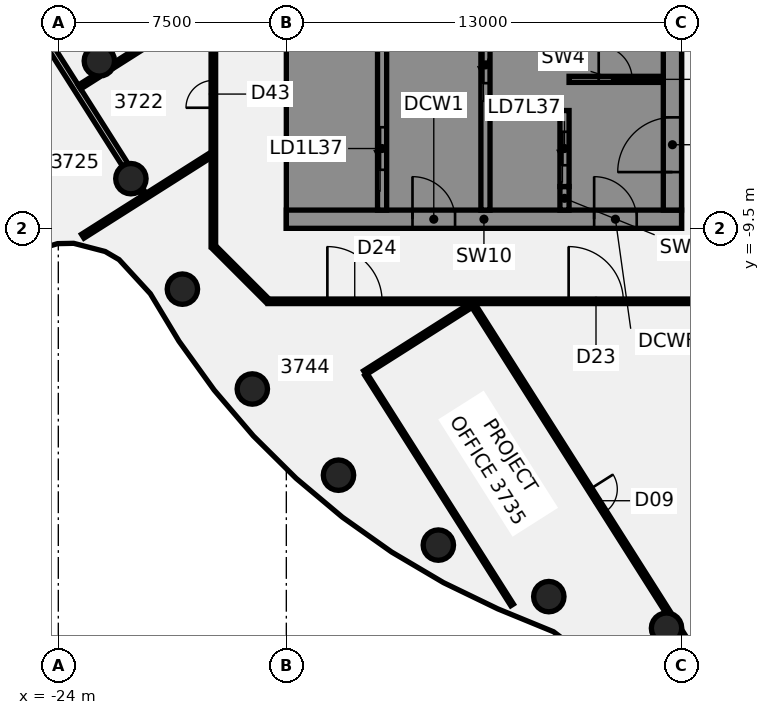
"""IFC4 building model, lengths in metres.
Left out: names, types, materials, properties, quantities, classifications, styles, units other than length and angle.
Written with IfcOpenShell. Run it as: python <this file> out.ifc"""

import sys

from ifc_helpers import new_model, si_unit, direction, frame, frame_2d, origin, origin_2d, place, context, subcontext, project, spatial, polyline, rectangle, circle, outline, extrude, element, fill, save


model = new_model("IFC4")
c1 = context("Model", 3, precision=1e-05, world=origin(), true_north=direction((0.0, 1.0)))
c2 = subcontext(c1, "Body", "Model", "MODEL_VIEW")
j1 = project(units=[si_unit("LENGTHUNIT", "METRE"), si_unit("PLANEANGLEUNIT", "RADIAN")], contexts=[c1])
p1 = place(None, origin())
s1 = spatial("IfcSite", under=j1, at=p1, CompositionType="ELEMENT")
p2 = place(p1, origin())
s2 = spatial("IfcBuilding", under=s1, at=p2, CompositionType="ELEMENT")
p3 = place(p2, frame((0.0, 0.0, 151.75)))
s3 = spatial("IfcBuildingStorey", under=s2, at=p3, CompositionType="ELEMENT", Elevation=151.75)
for number, where, z_axis, x_axis in (
    (1, (-22.651, -3.994, -0.14), (0.0, 0.0, 1.0), (1.0, 0.0, 0.0)),
    (2, (-21.613, -7.866, -0.14), (0.0, 0.0, 1.0), (1.0, 0.0, 0.0)),
    (3, (-19.919, -11.5, -0.14), (0.0, 0.0, 1.0), (1.0, 0.0, 0.0)),
    (4, (-17.619, -14.784, -0.14), (0.0, 0.0, 1.0), (1.0, 0.0, 0.0)),
    (5, (-14.784, -17.619, -0.14), (0.0, 0.0, 1.0), (1.0, 0.0, 0.0)),
    (6, (-11.5, -19.919, -0.14), (0.0, 0.0, 1.0), (1.0, 0.0, 0.0)),
    (7, (-7.866, -21.613, -0.14), (0.0, 0.0, 1.0), (1.0, 0.0, 0.0)),
    (8, (-3.994, -22.651, -0.14), (0.0, 0.0, 1.0), (1.0, 0.0, 0.0)),
):
    element("IfcColumn", number, at=place(p3, frame(where, z_axis=z_axis, x_axis=x_axis)), inside=s3, PredefinedType="COLUMN", context=c2, shape_type="SweptSolid", body=[
        extrude(circle(Radius=0.5, at=origin_2d()), origin(), (0.0, 0.0, 1.0), 3.75),
    ])
p4 = place(p3, frame((-28.798, 3.621, 0.0), z_axis=(0.0, 0.0, 1.0), x_axis=(0.535688347335, -0.844415771128, 0.0)))
e9 = element("IfcWall", 9, at=p4, inside=s3, PredefinedType="PARTITIONING", context=c2, shape_type="SweptSolid", body=[
    extrude(rectangle(XDim=13.06, YDim=0.2, at=frame_2d((6.53, 0.0))), origin(), (0.0, 0.0, 1.0), 3.01),
])
p5 = place(p4, frame((5.799, 0.0, 0.0)))
e10 = element("IfcOpeningElement", 10, at=p5, cuts=e9, PredefinedType="OPENING", context=c2, shape_type="SweptSolid", body=[
    extrude(rectangle(XDim=1.4, YDim=2.1, at=frame_2d((0.7, 1.05))), frame((0.0, 0.11, 0.0), z_axis=(0.0, -1.0, 0.0), x_axis=(1.0, 0.0, 0.0)), (0.0, 0.0, 1.0), 0.22),
])
p6 = place(p3, frame((-21.28, -8.23, 0.0), z_axis=(0.0, 0.0, 1.0), x_axis=(0.535205480582, -0.844721903087, 0.0)))
e11 = element("IfcWall", 11, at=p6, inside=s3, PredefinedType="PARTITIONING", context=c2, shape_type="SweptSolid", body=[
    extrude(rectangle(XDim=0.189, YDim=0.15, at=frame_2d((0.095, 0.0))), origin(), (0.0, 0.0, 1.0), 3.01),
])
p7 = place(p3, frame((-13.877, -14.312, 0.0), z_axis=(0.0, 0.0, 1.0), x_axis=(0.535664679525, -0.844430785268, 0.0)))
e12 = element("IfcWall", 12, at=p7, inside=s3, PredefinedType="PARTITIONING", context=c2, shape_type="SweptSolid", body=[
    extrude(rectangle(XDim=8.967, YDim=0.1, at=frame_2d((4.484, 0.0))), origin(), (0.0, 0.0, 1.0), 3.01),
])
p8 = place(p3, frame((-10.327, -12.067, 0.0), z_axis=(0.0, 0.0, 1.0), x_axis=(0.535642730436, -0.844444708273, 0.0)))
e13 = element("IfcWall", 13, at=p8, inside=s3, PredefinedType="PARTITIONING", context=c2, shape_type="SweptSolid", body=[
    extrude(rectangle(XDim=12.103, YDim=0.15, at=frame_2d((6.051, 0.0))), origin(), (0.0, 0.0, 1.0), 3.01),
])
p9 = place(p8, frame((7.12, 0.0, 0.0)))
e14 = element("IfcOpeningElement", 14, at=p9, cuts=e13, PredefinedType="OPENING", context=c2, shape_type="SweptSolid", body=[
    extrude(rectangle(XDim=0.9, YDim=2.1, at=frame_2d((0.45, 1.05))), frame((0.0, 0.085, 0.0), z_axis=(0.0, -1.0, 0.0), x_axis=(1.0, 0.0, 0.0)), (0.0, 0.0, 1.0), 0.17),
])
p10 = place(p3, frame((-3.604, -22.667, 0.0), z_axis=(0.0, 0.0, 1.0), x_axis=(0.535643435477, -0.844444261056, 0.0)))
e15 = element("IfcWall", 15, at=p10, inside=s3, PredefinedType="PARTITIONING", context=c2, shape_type="SweptSolid", body=[
    extrude(rectangle(XDim=5.067, YDim=0.15, at=frame_2d((2.533, 0.0))), origin(), (0.0, 0.0, 1.0), 3.01),
])
p11 = place(p10, frame((1.717, 0.0, 0.0)))
e16 = element("IfcOpeningElement", 16, at=p11, cuts=e15, PredefinedType="OPENING", context=c2, shape_type="SweptSolid", body=[
    extrude(rectangle(XDim=0.9, YDim=2.1, at=frame_2d((0.45, 1.05))), frame((0.0, 0.085, 0.0), z_axis=(0.0, -1.0, 0.0), x_axis=(1.0, 0.0, 0.0)), (0.0, 0.0, 1.0), 0.17),
])
p12 = place(p3, frame((-18.872, -10.128, 0.0), z_axis=(0.0, 0.0, 1.0), x_axis=(0.707106781187, -0.707106781187, 0.0)))
e17 = element("IfcWall", 17, at=p12, inside=s3, PredefinedType="PARTITIONING", context=c2, shape_type="SweptSolid", body=[
    extrude(rectangle(XDim=2.465, YDim=0.15, at=frame_2d((1.232, 0.0))), origin(), (0.0, 0.0, 1.0), 3.01),
])
p13 = place(p3, frame((-17.1, -11.9, 0.0), z_axis=(0.0, 0.0, 1.0), x_axis=(1.0, 0.0, 0.0)))
e18 = element("IfcWall", 18, at=p13, inside=s3, PredefinedType="PARTITIONING", context=c2, shape_type="SweptSolid", body=[
    extrude(rectangle(XDim=34.165, YDim=0.15, at=frame_2d((17.083, 0.0))), origin(), (0.0, 0.0, 1.0), 3.01),
])
p14 = place(p13, frame((9.886, 0.0, 0.0)))
e19 = element("IfcOpeningElement", 19, at=p14, cuts=e18, PredefinedType="OPENING", context=c2, shape_type="SweptSolid", body=[
    extrude(rectangle(XDim=1.8, YDim=2.1, at=frame_2d((0.9, 1.05))), frame((0.0, 0.085, 0.0), z_axis=(0.0, -1.0, 0.0), x_axis=(1.0, 0.0, 0.0)), (0.0, 0.0, 1.0), 0.17),
])
p15 = place(p13, frame((1.95, 0.0, 0.0)))
e20 = element("IfcOpeningElement", 20, at=p15, cuts=e18, PredefinedType="OPENING", context=c2, shape_type="SweptSolid", body=[
    extrude(rectangle(XDim=1.8, YDim=2.1, at=frame_2d((0.9, 1.05))), frame((0.0, 0.085, 0.0), z_axis=(0.0, -1.0, 0.0), x_axis=(1.0, 0.0, 0.0)), (0.0, 0.0, 1.0), 0.17),
])
p16 = place(p13, frame((24.043, 0.0, 0.0)))
e21 = element("IfcOpeningElement", 21, at=p16, cuts=e18, PredefinedType="OPENING", context=c2, shape_type="SweptSolid", body=[
    extrude(rectangle(XDim=1.8, YDim=2.1, at=frame_2d((0.9, 1.05))), frame((0.0, 0.085, 0.0), z_axis=(0.0, -1.0, 0.0), x_axis=(1.0, 0.0, 0.0)), (0.0, 0.0, 1.0), 0.17),
])
p17 = place(p3, frame((-23.304, -4.854, 0.0), z_axis=(0.0, 0.0, 1.0), x_axis=(0.844332505382, 0.535819578174, 0.0)))
e22 = element("IfcWall", 22, at=p17, inside=s3, PredefinedType="PARTITIONING", context=c2, shape_type="SweptSolid", body=[
    extrude(rectangle(XDim=0.688, YDim=0.15, at=frame_2d((0.344, 0.0))), origin(), (0.0, 0.0, 1.0), 3.01),
])
p18 = place(p3, frame((-22.18, -4.141, 0.0), z_axis=(0.0, 0.0, 1.0), x_axis=(0.844431403995, 0.535663704153, 0.0)))
e23 = element("IfcWall", 23, at=p18, inside=s3, PredefinedType="PARTITIONING", context=c2, shape_type="SweptSolid", body=[
    extrude(rectangle(XDim=3.769, YDim=0.15, at=frame_2d((1.885, 0.0))), origin(), (0.0, 0.0, 1.0), 3.01),
])
p19 = place(p3, frame((-23.197, -9.759, 0.0), z_axis=(0.0, 0.0, 1.0), x_axis=(0.844477168242, 0.535591553629, 0.0)))
e24 = element("IfcWall", 24, at=p19, inside=s3, PredefinedType="PARTITIONING", context=c2, shape_type="SweptSolid", body=[
    extrude(rectangle(XDim=4.973, YDim=0.15, at=frame_2d((2.487, 0.0))), origin(), (0.0, 0.0, 1.0), 3.01),
])
p20 = place(p3, frame((-13.917, -14.249, 0.0), z_axis=(0.0, 0.0, 1.0), x_axis=(0.844421821782, 0.535678809454, 0.0)))
e25 = element("IfcWall", 25, at=p20, inside=s3, PredefinedType="PARTITIONING", context=c2, shape_type="SweptSolid", body=[
    extrude(rectangle(XDim=4.16, YDim=0.15, at=frame_2d((2.08, 0.0))), origin(), (0.0, 0.0, 1.0), 3.01),
])
p21 = place(p3, frame((-3.621, -28.798, 0.0), z_axis=(0.0, 0.0, 1.0), x_axis=(0.844419013284, 0.535683236627, 0.0)))
e26 = element("IfcWall", 26, at=p21, inside=s3, PredefinedType="PARTITIONING", context=c2, shape_type="SweptSolid", body=[
    extrude(rectangle(XDim=13.322, YDim=0.2, at=frame_2d((6.661, 0.0))), origin(), (0.0, 0.0, 1.0), 3.01),
])
p22 = place(p21, frame((6.099, 0.0, 0.0)))
e27 = element("IfcOpeningElement", 27, at=p22, cuts=e26, PredefinedType="OPENING", context=c2, shape_type="SweptSolid", body=[
    extrude(rectangle(XDim=1.4, YDim=2.1, at=frame_2d((0.7, 1.05))), frame((0.0, 0.11, 0.0), z_axis=(0.0, -1.0, 0.0), x_axis=(1.0, 0.0, 0.0)), (0.0, 0.0, 1.0), 0.22),
])
p23 = place(p3, frame((-18.9, -10.1, 0.0), z_axis=(0.0, 0.0, 1.0), x_axis=(0.0, 1.0, 0.0)))
e28 = element("IfcWall", 28, at=p23, inside=s3, PredefinedType="PARTITIONING", context=c2, shape_type="SweptSolid", body=[
    extrude(rectangle(XDim=20.2, YDim=0.15, at=frame_2d((10.1, 0.0))), origin(), (0.0, 0.0, 1.0), 3.01),
])
p24 = place(p23, frame((12.09, 0.0, 0.0)))
e29 = element("IfcOpeningElement", 29, at=p24, cuts=e28, PredefinedType="OPENING", context=c2, shape_type="SweptSolid", body=[
    extrude(rectangle(XDim=1.8, YDim=2.1, at=frame_2d((0.9, 1.05))), frame((0.0, 0.085, 0.0), z_axis=(0.0, -1.0, 0.0), x_axis=(1.0, 0.0, 0.0)), (0.0, 0.0, 1.0), 0.17),
])
p25 = place(p23, frame((4.566, 0.0, 0.0)))
e30 = element("IfcOpeningElement", 30, at=p25, cuts=e28, PredefinedType="OPENING", context=c2, shape_type="SweptSolid", body=[
    extrude(rectangle(XDim=0.9, YDim=2.1, at=frame_2d((0.45, 1.05))), frame((0.0, 0.085, 0.0), z_axis=(0.0, -1.0, 0.0), x_axis=(1.0, 0.0, 0.0)), (0.0, 0.0, 1.0), 0.17),
])
p26 = place(p3, frame((-16.5, -9.2, 0.0), z_axis=(0.0, 0.0, 1.0), x_axis=(1.0, 0.0, 0.0)))
e31 = element("IfcWall", 31, at=p26, inside=s3, PredefinedType="SHEAR", context=c2, shape_type="SweptSolid", body=[
    extrude(rectangle(XDim=13.0, YDim=0.6, at=frame_2d((6.5, 0.0))), origin(), (0.0, 0.0, 1.0), 3.61),
])
p27 = place(p26, frame((4.15, 0.0, 0.0)))
e32 = element("IfcOpeningElement", 32, at=p27, cuts=e31, PredefinedType="OPENING", context=c2, shape_type="SweptSolid", body=[
    extrude(rectangle(XDim=1.4, YDim=2.1, at=frame_2d((0.7, 1.05))), frame((0.0, 0.31, 0.0), z_axis=(0.0, -1.0, 0.0), x_axis=(1.0, 0.0, 0.0)), (0.0, 0.0, 1.0), 0.62),
])
p28 = place(p26, frame((10.125, 0.0, 0.0)))
e33 = element("IfcOpeningElement", 33, at=p28, cuts=e31, PredefinedType="OPENING", context=c2, shape_type="SweptSolid", body=[
    extrude(rectangle(XDim=1.4, YDim=2.1, at=frame_2d((0.7, 1.05))), frame((0.0, 0.31, 0.0), z_axis=(0.0, -1.0, 0.0), x_axis=(1.0, 0.0, 0.0)), (0.0, 0.0, 1.0), 0.62),
])
p29 = place(p3, origin())
e34 = element("IfcWall", 34, at=p29, inside=s3, PredefinedType="SHEAR", context=c2, shape_type="SweptSolid", body=[
    extrude(outline(polyline([(-13.5, -8.125), (-15.9, -8.125), (-15.9, -5.625), (-13.5, -5.625), (-13.5, -5.375), (-15.9, -5.375), (-15.9, 5.375), (-13.5, 5.375), (-13.5, 5.625), (-15.9, 5.625), (-15.9, 8.125), (-13.5, 8.125), (-13.5, 8.9), (-15.9, 8.9), (-16.5, 8.9), (-16.5, -8.9), (-15.9, -8.9), (-13.5, -8.9), (-13.5, -8.125)])), origin(), (0.0, 0.0, 1.0), 3.61),
])
p30 = place(p3, origin())
e35 = element("IfcWall", 35, at=p30, inside=s3, PredefinedType="SHEAR", context=c2, shape_type="SweptSolid", body=[
    extrude(outline(polyline([(-9.8, -5.375), (-9.8, -5.625), (-7.5, -5.625), (-7.2, -5.625), (-7.2, 8.9), (-7.5, 8.9), (-9.8, 8.9), (-9.8, 8.125), (-7.5, 8.125), (-7.5, 5.625), (-9.8, 5.625), (-9.8, 5.375), (-7.5, 5.375), (-7.5, 2.875), (-9.8, 2.875), (-9.8, 2.625), (-7.5, 2.625), (-7.5, 0.125), (-9.8, 0.125), (-9.8, -0.125), (-7.5, -0.125), (-7.5, -2.625), (-9.8, -2.625), (-9.8, -2.875), (-7.5, -2.875), (-7.5, -5.375), (-9.8, -5.375)])), origin(), (0.0, 0.0, 1.0), 3.61),
])
p31 = place(p3, origin())
e36 = element("IfcWall", 36, at=p31, inside=s3, PredefinedType="SHEAR", context=c2, shape_type="SweptSolid", body=[
    extrude(outline(polyline([(-7.5, -8.125), (-9.55, -8.125), (-9.55, -5.625), (-9.8, -5.625), (-9.8, -8.125), (-9.8, -8.9), (-7.5, -8.9), (-7.5, -8.125)])), origin(), (0.0, 0.0, 1.0), 3.61),
])
p32 = place(p3, frame((-7.35, -8.9, 0.0), z_axis=(0.0, 0.0, 1.0), x_axis=(0.0, 1.0, 0.0)))
e37 = element("IfcWall", 37, at=p32, inside=s3, PredefinedType="SHEAR", context=c2, shape_type="SweptSolid", body=[
    extrude(rectangle(XDim=0.775, YDim=0.3, at=frame_2d((0.387, 0.0))), origin(), (0.0, 0.0, 1.0), 3.61),
])
p33 = place(p3, frame((-13.35, -8.9, 0.0), z_axis=(0.0, 0.0, 1.0), x_axis=(0.0, 1.0, 0.0)))
e38 = element("IfcWall", 38, at=p33, inside=s3, PredefinedType="SHEAR", context=c2, shape_type="SweptSolid", body=[
    extrude(rectangle(XDim=17.8, YDim=0.3, at=frame_2d((8.9, 0.0))), origin(), (0.0, 0.0, 1.0), 3.61),
])
p34 = place(p33, frame((1.325, 0.0, 0.0)))
e39 = element("IfcOpeningElement", 39, at=p34, cuts=e38, PredefinedType="OPENING", context=c2, shape_type="SweptSolid", body=[
    extrude(rectangle(XDim=1.4, YDim=2.1, at=frame_2d((0.7, 1.05))), frame((0.0, 0.16, 0.0), z_axis=(0.0, -1.0, 0.0), x_axis=(1.0, 0.0, 0.0)), (0.0, 0.0, 1.0), 0.32),
])
p35 = place(p33, frame((6.546, 0.0, 0.0)))
e40 = element("IfcOpeningElement", 40, at=p35, cuts=e38, PredefinedType="OPENING", context=c2, shape_type="SweptSolid", body=[
    extrude(rectangle(XDim=1.0, YDim=2.1, at=frame_2d((0.5, 1.05))), frame((0.0, 0.16, 0.0), z_axis=(0.0, -1.0, 0.0), x_axis=(1.0, 0.0, 0.0)), (0.0, 0.0, 1.0), 0.32),
])
p36 = place(p33, frame((12.046, 0.0, 0.0)))
e41 = element("IfcOpeningElement", 41, at=p36, cuts=e38, PredefinedType="OPENING", context=c2, shape_type="SweptSolid", body=[
    extrude(rectangle(XDim=1.0, YDim=2.1, at=frame_2d((0.5, 1.05))), frame((0.0, 0.16, 0.0), z_axis=(0.0, -1.0, 0.0), x_axis=(1.0, 0.0, 0.0)), (0.0, 0.0, 1.0), 0.32),
])
p37 = place(p3, frame((-9.95, -8.9, 0.0), z_axis=(0.0, 0.0, 1.0), x_axis=(0.0, 1.0, 0.0)))
e42 = element("IfcWall", 42, at=p37, inside=s3, PredefinedType="SHEAR", context=c2, shape_type="SweptSolid", body=[
    extrude(rectangle(XDim=17.8, YDim=0.3, at=frame_2d((8.9, 0.0))), origin(), (0.0, 0.0, 1.0), 3.61),
])
p38 = place(p37, frame((4.175, 0.0, 0.0)))
e43 = element("IfcOpeningElement", 43, at=p38, cuts=e42, PredefinedType="OPENING", context=c2, shape_type="SweptSolid", body=[
    extrude(rectangle(XDim=1.2, YDim=2.1, at=frame_2d((0.6, 1.05))), frame((0.0, 0.16, 0.0), z_axis=(0.0, -1.0, 0.0), x_axis=(1.0, 0.0, 0.0)), (0.0, 0.0, 1.0), 0.32),
])
p39 = place(p37, frame((6.925, 0.0, 0.0)))
e44 = element("IfcOpeningElement", 44, at=p39, cuts=e42, PredefinedType="OPENING", context=c2, shape_type="SweptSolid", body=[
    extrude(rectangle(XDim=1.2, YDim=2.1, at=frame_2d((0.6, 1.05))), frame((0.0, 0.16, 0.0), z_axis=(0.0, -1.0, 0.0), x_axis=(1.0, 0.0, 0.0)), (0.0, 0.0, 1.0), 0.32),
])
p40 = place(p3, frame((-7.35, -8.125, 0.0), z_axis=(0.0, 0.0, 1.0), x_axis=(0.0, 1.0, 0.0)))
e45 = element("IfcWall", 45, at=p40, inside=s3, PredefinedType="SHEAR", context=c2, shape_type="SweptSolid", body=[
    extrude(rectangle(XDim=2.5, YDim=0.3, at=frame_2d((1.25, 0.0))), origin(), (0.0, 0.0, 1.0), 3.61),
])
p41 = place(p40, frame((0.7, 0.0, 0.0)))
e46 = element("IfcOpeningElement", 46, at=p41, cuts=e45, PredefinedType="OPENING", context=c2, shape_type="SweptSolid", body=[
    extrude(rectangle(XDim=1.1, YDim=2.1, at=frame_2d((0.55, 1.05))), frame((0.0, 0.16, 0.0), z_axis=(0.0, -1.0, 0.0), x_axis=(1.0, 0.0, 0.0)), (0.0, 0.0, 1.0), 0.32),
])
p42 = place(p3, frame((-3.8, -8.9, 0.0), z_axis=(0.0, 0.0, 1.0), x_axis=(0.0, 1.0, 0.0)))
e47 = element("IfcWall", 47, at=p42, inside=s3, PredefinedType="SHEAR", context=c2, shape_type="SweptSolid", body=[
    extrude(rectangle(XDim=17.8, YDim=0.6, at=frame_2d((8.9, 0.0))), origin(), (0.0, 0.0, 1.0), 3.61),
])
p43 = place(p42, frame((1.25, 0.0, 0.0)))
e48 = element("IfcOpeningElement", 48, at=p43, cuts=e47, PredefinedType="OPENING", context=c2, shape_type="SweptSolid", body=[
    extrude(rectangle(XDim=1.8, YDim=2.1, at=frame_2d((0.9, 1.05))), frame((0.0, 0.31, 0.0), z_axis=(0.0, -1.0, 0.0), x_axis=(1.0, 0.0, 0.0)), (0.0, 0.0, 1.0), 0.62),
])
p44 = place(p42, frame((11.698, 0.0, 0.0)))
e49 = element("IfcOpeningElement", 49, at=p44, cuts=e47, PredefinedType="OPENING", context=c2, shape_type="SweptSolid", body=[
    extrude(rectangle(XDim=1.0, YDim=2.1, at=frame_2d((0.5, 1.05))), frame((0.0, 0.31, 0.0), z_axis=(0.0, -1.0, 0.0), x_axis=(1.0, 0.0, 0.0)), (0.0, 0.0, 1.0), 0.62),
])
p45 = place(p42, frame((15.222, 0.0, 0.0)))
e50 = element("IfcOpeningElement", 50, at=p45, cuts=e47, PredefinedType="OPENING", context=c2, shape_type="SweptSolid", body=[
    extrude(rectangle(XDim=1.0, YDim=2.1, at=frame_2d((0.5, 1.05))), frame((0.0, 0.31, 0.0), z_axis=(0.0, -1.0, 0.0), x_axis=(1.0, 0.0, 0.0)), (0.0, 0.0, 1.0), 0.62),
])
p46 = place(p3, frame((-7.2, -4.6, 0.0), z_axis=(0.0, 0.0, 1.0), x_axis=(1.0, 0.0, 0.0)))
e51 = element("IfcWall", 51, at=p46, inside=s3, PredefinedType="SHEAR", context=c2, shape_type="SweptSolid", body=[
    extrude(rectangle(XDim=3.1, YDim=0.2, at=frame_2d((1.55, 0.0))), origin(), (0.0, 0.0, 1.0), 3.61),
])
p47 = place(p46, frame((0.975, 0.0, 0.0)))
e52 = element("IfcOpeningElement", 52, at=p47, cuts=e51, PredefinedType="OPENING", context=c2, shape_type="SweptSolid", body=[
    extrude(rectangle(XDim=1.1, YDim=2.1, at=frame_2d((0.55, 1.05))), frame((0.0, 0.11, 0.0), z_axis=(0.0, -1.0, 0.0), x_axis=(1.0, 0.0, 0.0)), (0.0, 0.0, 1.0), 0.22),
])
p48 = place(p9, frame((0.9, 0.0, 0.0), z_axis=(0.0, 0.0, 1.0), x_axis=(-1.0, 0.0, 0.0)))
e53 = element("IfcDoor", 53, at=p48, inside=s3, OperationType="SINGLE_SWING_RIGHT", PredefinedType="DOOR", context=c2, shape_type="SweptSolid", body=[
    extrude(rectangle(XDim=0.9, YDim=2.1, at=frame_2d((0.45, 1.05))), frame((0.0, 0.025, 0.0), z_axis=(0.0, -1.0, 0.0), x_axis=(1.0, 0.0, 0.0)), (0.0, 0.0, 1.0), 0.05),
])
fill(e14, e53)
p49 = place(p14, origin())
e54 = element("IfcDoor", 54, at=p49, inside=s3, OperationType="DOUBLE_DOOR_SINGLE_SWING", PredefinedType="DOOR", context=c2, shape_type="SweptSolid", body=[
    extrude(rectangle(XDim=1.8, YDim=2.1, at=frame_2d((0.9, 1.05))), frame((0.0, 0.025, 0.0), z_axis=(0.0, -1.0, 0.0), x_axis=(1.0, 0.0, 0.0)), (0.0, 0.0, 1.0), 0.05),
])
fill(e19, e54)
p50 = place(p15, frame((1.8, 0.0, 0.0), z_axis=(0.0, 0.0, 1.0), x_axis=(-1.0, 0.0, 0.0)))
e55 = element("IfcDoor", 55, at=p50, inside=s3, OperationType="DOUBLE_DOOR_SINGLE_SWING", PredefinedType="DOOR", context=c2, shape_type="SweptSolid", body=[
    extrude(rectangle(XDim=1.8, YDim=2.1, at=frame_2d((0.9, 1.05))), frame((0.0, 0.025, 0.0), z_axis=(0.0, -1.0, 0.0), x_axis=(1.0, 0.0, 0.0)), (0.0, 0.0, 1.0), 0.05),
])
fill(e20, e55)
p51 = place(p25, origin())
e56 = element("IfcDoor", 56, at=p51, inside=s3, OperationType="SINGLE_SWING_RIGHT", PredefinedType="DOOR", context=c2, shape_type="SweptSolid", body=[
    extrude(rectangle(XDim=0.9, YDim=2.1, at=frame_2d((0.45, 1.05))), frame((0.0, 0.025, 0.0), z_axis=(0.0, -1.0, 0.0), x_axis=(1.0, 0.0, 0.0)), (0.0, 0.0, 1.0), 0.05),
])
fill(e30, e56)
p52 = place(p27, origin())
e57 = element("IfcDoor", 57, at=p52, inside=s3, OperationType="SINGLE_SWING_LEFT", PredefinedType="DOOR", context=c2, shape_type="SweptSolid", body=[
    extrude(rectangle(XDim=1.4, YDim=2.1, at=frame_2d((0.7, 1.05))), frame((0.0, 0.025, 0.0), z_axis=(0.0, -1.0, 0.0), x_axis=(1.0, 0.0, 0.0)), (0.0, 0.0, 1.0), 0.05),
])
fill(e32, e57)
p53 = place(p28, origin())
e58 = element("IfcDoor", 58, at=p53, inside=s3, OperationType="SINGLE_SWING_LEFT", PredefinedType="DOOR", context=c2, shape_type="SweptSolid", body=[
    extrude(rectangle(XDim=1.4, YDim=2.1, at=frame_2d((0.7, 1.05))), frame((0.0, 0.025, 0.0), z_axis=(0.0, -1.0, 0.0), x_axis=(1.0, 0.0, 0.0)), (0.0, 0.0, 1.0), 0.05),
])
fill(e33, e58)
p54 = place(p43, origin())
e59 = element("IfcDoor", 59, at=p54, inside=s3, OperationType="SINGLE_SWING_LEFT", PredefinedType="DOOR", context=c2, shape_type="SweptSolid", body=[
    extrude(rectangle(XDim=1.8, YDim=2.1, at=frame_2d((0.9, 1.05))), frame((0.0, 0.025, 0.0), z_axis=(0.0, -1.0, 0.0), x_axis=(1.0, 0.0, 0.0)), (0.0, 0.0, 1.0), 0.05),
])
fill(e48, e59)
p55 = place(p47, origin())
e60 = element("IfcDoor", 60, at=p55, inside=s3, OperationType="SINGLE_SWING_LEFT", PredefinedType="DOOR", context=c2, shape_type="SweptSolid", body=[
    extrude(rectangle(XDim=1.1, YDim=2.1, at=frame_2d((0.55, 1.05))), frame((0.0, 0.025, 0.0), z_axis=(0.0, -1.0, 0.0), x_axis=(1.0, 0.0, 0.0)), (0.0, 0.0, 1.0), 0.05),
])
fill(e52, e60)
p56 = place(p34, origin())
e61 = element("IfcDoor", 61, at=p56, inside=s3, OperationType="SLIDING_TO_LEFT", PredefinedType="DOOR", context=c2, shape_type="SweptSolid", body=[
    extrude(rectangle(XDim=1.4, YDim=2.1, at=frame_2d((0.7, 1.05))), frame((0.0, 0.025, 0.0), z_axis=(0.0, -1.0, 0.0), x_axis=(1.0, 0.0, 0.0)), (0.0, 0.0, 1.0), 0.05),
])
fill(e39, e61)
p57 = place(p41, origin())
e62 = element("IfcDoor", 62, at=p57, inside=s3, OperationType="SLIDING_TO_LEFT", PredefinedType="DOOR", context=c2, shape_type="SweptSolid", body=[
    extrude(rectangle(XDim=1.1, YDim=2.1, at=frame_2d((0.55, 1.05))), frame((0.0, 0.025, 0.0), z_axis=(0.0, -1.0, 0.0), x_axis=(1.0, 0.0, 0.0)), (0.0, 0.0, 1.0), 0.05),
])
fill(e46, e62)
p58 = place(p38, origin())
e63 = element("IfcDoor", 63, at=p58, inside=s3, OperationType="SLIDING_TO_LEFT", PredefinedType="DOOR", context=c2, shape_type="SweptSolid", body=[
    extrude(rectangle(XDim=1.2, YDim=2.1, at=frame_2d((0.6, 1.05))), frame((0.0, 0.025, 0.0), z_axis=(0.0, -1.0, 0.0), x_axis=(1.0, 0.0, 0.0)), (0.0, 0.0, 1.0), 0.05),
])
fill(e43, e63)
save(model, sys.argv[1])
